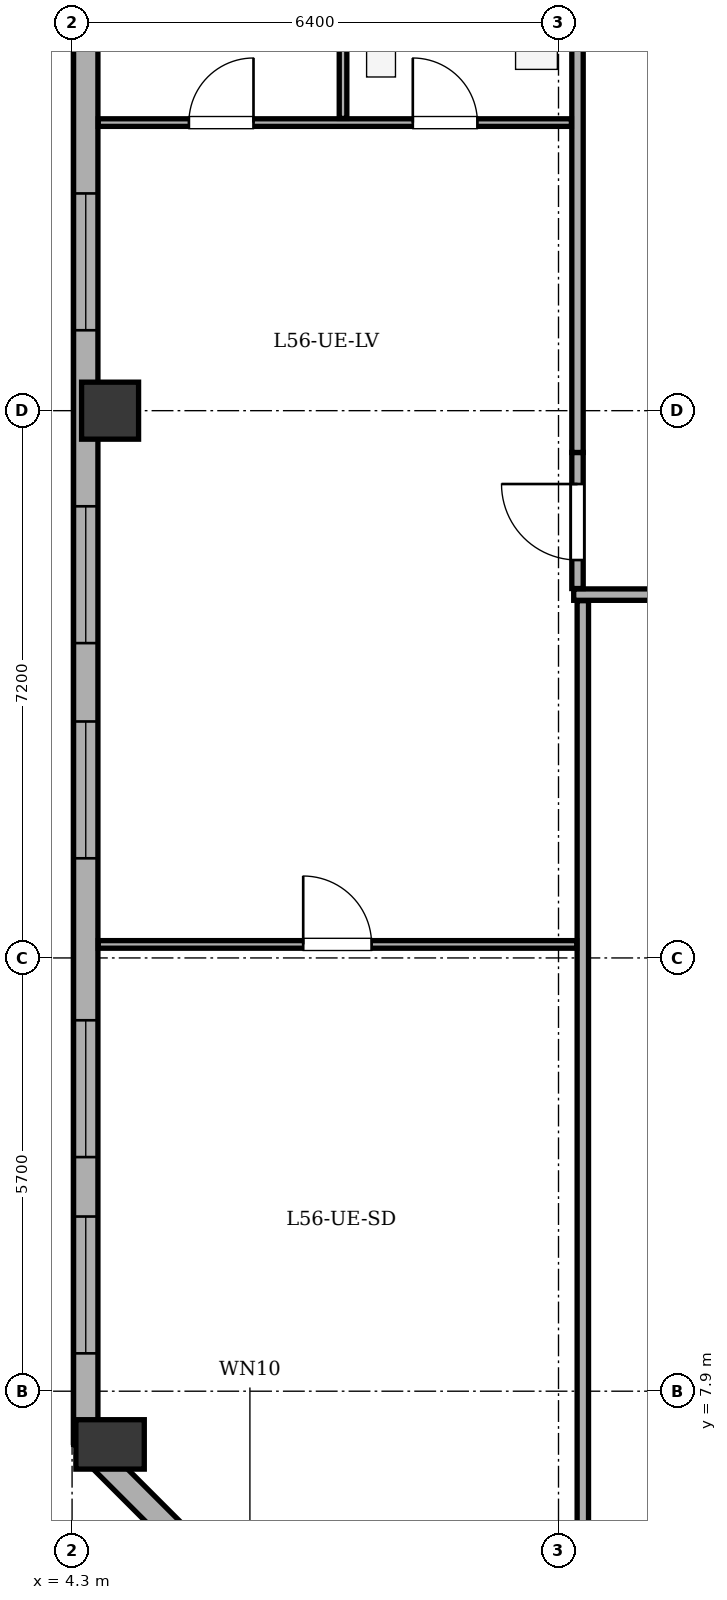
"""IFC4 building model, lengths in metres.
Left out: names, types, materials, properties, quantities, classifications, styles, units other than length and angle.
Written with IfcOpenShell. Run it as: python <this file> out.ifc"""

import sys

from ifc_helpers import new_model, si_unit, direction, frame, frame_2d, origin, origin_2d, place, context, subcontext, project, spatial, rectangle, extrude, element, fill, save


model = new_model("IFC4")
c1 = context("Model", 3, precision=1e-05, world=origin(), true_north=direction((0.0, 1.0)))
c2 = subcontext(c1, "Body", "Model", "MODEL_VIEW")
j1 = project(units=[si_unit("LENGTHUNIT", "METRE"), si_unit("PLANEANGLEUNIT", "RADIAN")], contexts=[c1])
p1 = place(None, origin())
s1 = spatial("IfcSite", under=j1, at=p1, CompositionType="ELEMENT")
p2 = place(p1, origin())
s2 = spatial("IfcBuilding", under=s1, at=p2, CompositionType="ELEMENT")
p3 = place(p2, frame((0.0, 0.0, 217.7)))
s3 = spatial("IfcBuildingStorey", under=s2, at=p3, CompositionType="ELEMENT", Elevation=217.7)
p4 = place(p3, frame((4.8, 7.2, 0.0), z_axis=(0.0, 0.0, 1.0), x_axis=(1.0, 0.0, 0.0)))
e1 = element("IfcColumn", 1, at=p4, inside=s3, PredefinedType="COLUMN", context=c2, shape_type="SweptSolid", body=[
    extrude(rectangle(XDim=0.65, YDim=0.9, at=origin_2d()), origin(), (0.0, 0.0, 1.0), 3.4),
])
p5 = place(p3, frame((4.8, 20.8, 0.0), z_axis=(0.0, 0.0, 1.0), x_axis=(1.0, 0.0, 0.0)))
e2 = element("IfcColumn", 2, at=p5, inside=s3, PredefinedType="COLUMN", context=c2, shape_type="SweptSolid", body=[
    extrude(rectangle(XDim=0.75, YDim=0.75, at=origin_2d()), origin(), (0.0, 0.0, 1.0), 3.4),
])
p6 = place(p3, frame((8.8, 2.88, 0.0), z_axis=(0.0, 0.0, 1.0), x_axis=(-0.707106781187, 0.707106781187, 0.0)))
e3 = element("IfcWall", 3, at=p6, inside=s3, PredefinedType="STANDARD", context=c2, shape_type="SweptSolid", body=[
    extrude(rectangle(XDim=6.11, YDim=0.32, at=frame_2d((3.055, 0.0))), origin(), (0.0, 0.0, 1.0), 2.725),
])
p7 = place(p6, frame((2.355, 0.0, 0.75)))
e4 = element("IfcOpeningElement", 4, at=p7, cuts=e3, PredefinedType="OPENING", context=c2, shape_type="SweptSolid", body=[
    extrude(rectangle(XDim=1.4, YDim=1.65, at=frame_2d((0.7, 0.825))), frame((0.0, 0.17, 0.0), z_axis=(0.0, -1.0, 0.0), x_axis=(1.0, 0.0, 0.0)), (0.0, 0.0, 1.0), 0.34),
])
p8 = place(p3, frame((4.48, 7.2, 0.0), z_axis=(0.0, 0.0, 1.0), x_axis=(0.0, 1.0, 0.0)))
e5 = element("IfcWall", 5, at=p8, inside=s3, PredefinedType="STANDARD", context=c2, shape_type="SweptSolid", body=[
    extrude(rectangle(XDim=27.8, YDim=0.32, at=frame_2d((13.9, 0.0))), origin(), (0.0, 0.0, 1.0), 2.725),
])
p9 = place(p8, frame((1.198, 0.0, 0.75)))
e6 = element("IfcOpeningElement", 6, at=p9, cuts=e5, PredefinedType="OPENING", context=c2, shape_type="SweptSolid", body=[
    extrude(rectangle(XDim=1.8, YDim=1.7, at=frame_2d((0.9, 0.85))), frame((0.0, 0.17, 0.0), z_axis=(0.0, -1.0, 0.0), x_axis=(1.0, 0.0, 0.0)), (0.0, 0.0, 1.0), 0.34),
])
p10 = place(p8, frame((3.78, 0.0, 0.75)))
e7 = element("IfcOpeningElement", 7, at=p10, cuts=e5, PredefinedType="OPENING", context=c2, shape_type="SweptSolid", body=[
    extrude(rectangle(XDim=1.8, YDim=1.7, at=frame_2d((0.9, 0.85))), frame((0.0, 0.17, 0.0), z_axis=(0.0, -1.0, 0.0), x_axis=(1.0, 0.0, 0.0)), (0.0, 0.0, 1.0), 0.34),
])
p11 = place(p8, frame((7.711, 0.0, 0.75)))
e8 = element("IfcOpeningElement", 8, at=p11, cuts=e5, PredefinedType="OPENING", context=c2, shape_type="SweptSolid", body=[
    extrude(rectangle(XDim=1.8, YDim=1.7, at=frame_2d((0.9, 0.85))), frame((0.0, 0.17, 0.0), z_axis=(0.0, -1.0, 0.0), x_axis=(1.0, 0.0, 0.0)), (0.0, 0.0, 1.0), 0.34),
])
p12 = place(p8, frame((10.542, 0.0, 0.75)))
e9 = element("IfcOpeningElement", 9, at=p12, cuts=e5, PredefinedType="OPENING", context=c2, shape_type="SweptSolid", body=[
    extrude(rectangle(XDim=1.8, YDim=1.7, at=frame_2d((0.9, 0.85))), frame((0.0, 0.17, 0.0), z_axis=(0.0, -1.0, 0.0), x_axis=(1.0, 0.0, 0.0)), (0.0, 0.0, 1.0), 0.34),
])
p13 = place(p8, frame((14.658, 0.0, 0.75)))
e10 = element("IfcOpeningElement", 10, at=p13, cuts=e5, PredefinedType="OPENING", context=c2, shape_type="SweptSolid", body=[
    extrude(rectangle(XDim=1.8, YDim=1.7, at=frame_2d((0.9, 0.85))), frame((0.0, 0.17, 0.0), z_axis=(0.0, -1.0, 0.0), x_axis=(1.0, 0.0, 0.0)), (0.0, 0.0, 1.0), 0.34),
])
p14 = place(p8, frame((23.543, 0.0, 0.75)))
e11 = element("IfcOpeningElement", 11, at=p14, cuts=e5, PredefinedType="OPENING", context=c2, shape_type="SweptSolid", body=[
    extrude(rectangle(XDim=1.8, YDim=1.7, at=frame_2d((0.9, 0.85))), frame((0.0, 0.17, 0.0), z_axis=(0.0, -1.0, 0.0), x_axis=(1.0, 0.0, 0.0)), (0.0, 0.0, 1.0), 0.34),
])
p15 = place(p3, frame((10.9, 18.38, 0.0), z_axis=(0.0, 0.0, 1.0), x_axis=(1.0, 0.0, 0.0)))
e12 = element("IfcWall", 12, at=p15, inside=s3, PredefinedType="PARTITIONING", context=c2, shape_type="SweptSolid", body=[
    extrude(rectangle(XDim=34.02, YDim=0.15, at=frame_2d((17.01, 0.0))), origin(), (0.0, 0.0, 1.0), 3.1),
])
p16 = place(p15, frame((3.674, 0.0, 0.0)))
e13 = element("IfcOpeningElement", 13, at=p16, cuts=e12, PredefinedType="OPENING", context=c2, shape_type="SweptSolid", body=[
    extrude(rectangle(XDim=1.0, YDim=2.1, at=frame_2d((0.5, 1.05))), frame((0.0, 0.085, 0.0), z_axis=(0.0, -1.0, 0.0), x_axis=(1.0, 0.0, 0.0)), (0.0, 0.0, 1.0), 0.17),
])
p17 = place(p15, frame((12.118, 0.0, 0.0)))
e14 = element("IfcOpeningElement", 14, at=p17, cuts=e12, PredefinedType="OPENING", context=c2, shape_type="SweptSolid", body=[
    extrude(rectangle(XDim=1.0, YDim=2.1, at=frame_2d((0.5, 1.05))), frame((0.0, 0.085, 0.0), z_axis=(0.0, -1.0, 0.0), x_axis=(1.0, 0.0, 0.0)), (0.0, 0.0, 1.0), 0.17),
])
p18 = place(p15, frame((20.901, 0.0, 0.0)))
e15 = element("IfcOpeningElement", 15, at=p18, cuts=e12, PredefinedType="OPENING", context=c2, shape_type="SweptSolid", body=[
    extrude(rectangle(XDim=1.0, YDim=2.1, at=frame_2d((0.5, 1.05))), frame((0.0, 0.085, 0.0), z_axis=(0.0, -1.0, 0.0), x_axis=(1.0, 0.0, 0.0)), (0.0, 0.0, 1.0), 0.17),
])
p19 = place(p15, frame((29.346, 0.0, 0.0)))
e16 = element("IfcOpeningElement", 16, at=p19, cuts=e12, PredefinedType="OPENING", context=c2, shape_type="SweptSolid", body=[
    extrude(rectangle(XDim=1.0, YDim=2.1, at=frame_2d((0.5, 1.05))), frame((0.0, 0.085, 0.0), z_axis=(0.0, -1.0, 0.0), x_axis=(1.0, 0.0, 0.0)), (0.0, 0.0, 1.0), 0.17),
])
p20 = place(p3, frame((11.02, 3.045, 0.0), z_axis=(0.0, 0.0, 1.0), x_axis=(0.0, 1.0, 0.0)))
e17 = element("IfcWall", 17, at=p20, inside=s3, PredefinedType="PARTITIONING", context=c2, shape_type="SweptSolid", body=[
    extrude(rectangle(XDim=15.255, YDim=0.15, at=frame_2d((7.627, 0.0))), origin(), (0.0, 0.0, 1.0), 3.1),
])
p21 = place(p3, frame((10.95, 18.46, 0.0), z_axis=(0.0, 0.0, 1.0), x_axis=(0.0, 1.0, 0.0)))
e18 = element("IfcWall", 18, at=p21, inside=s3, PredefinedType="PARTITIONING", context=c2, shape_type="SweptSolid", body=[
    extrude(rectangle(XDim=1.79, YDim=0.15, at=frame_2d((0.895, 0.0))), origin(), (0.0, 0.0, 1.0), 3.1),
])
p22 = place(p21, frame((0.375, 0.0, 0.0)))
e19 = element("IfcOpeningElement", 19, at=p22, cuts=e18, PredefinedType="OPENING", context=c2, shape_type="SweptSolid", body=[
    extrude(rectangle(XDim=1.0, YDim=2.1, at=frame_2d((0.5, 1.05))), frame((0.0, 0.085, 0.0), z_axis=(0.0, -1.0, 0.0), x_axis=(1.0, 0.0, 0.0)), (0.0, 0.0, 1.0), 0.17),
])
p23 = place(p3, frame((10.95, 20.25, 0.0), z_axis=(0.0, 0.0, 1.0), x_axis=(0.0, 1.0, 0.0)))
e20 = element("IfcWall", 20, at=p23, inside=s3, PredefinedType="PARTITIONING", context=c2, shape_type="SweptSolid", body=[
    extrude(rectangle(XDim=13.9, YDim=0.15, at=frame_2d((6.95, 0.0))), origin(), (0.0, 0.0, 1.0), 3.1),
])
p24 = place(p3, frame((4.645, 24.59, 0.0), z_axis=(0.0, 0.0, 1.0), x_axis=(1.0, 0.0, 0.0)))
e21 = element("IfcWall", 21, at=p24, inside=s3, PredefinedType="PARTITIONING", context=c2, shape_type="SweptSolid", body=[
    extrude(rectangle(XDim=6.225, YDim=0.1, at=frame_2d((3.113, 0.0))), origin(), (0.0, 0.0, 1.0), 3.1),
])
p25 = place(p24, frame((1.192, 0.0, 0.0)))
e22 = element("IfcOpeningElement", 22, at=p25, cuts=e21, PredefinedType="OPENING", context=c2, shape_type="SweptSolid", body=[
    extrude(rectangle(XDim=0.85, YDim=2.05, at=frame_2d((0.425, 1.025))), frame((0.0, 0.06, 0.0), z_axis=(0.0, -1.0, 0.0), x_axis=(1.0, 0.0, 0.0)), (0.0, 0.0, 1.0), 0.12),
])
p26 = place(p24, frame((4.138, 0.0, 0.0)))
e23 = element("IfcOpeningElement", 23, at=p26, cuts=e21, PredefinedType="OPENING", context=c2, shape_type="SweptSolid", body=[
    extrude(rectangle(XDim=0.85, YDim=2.05, at=frame_2d((0.425, 1.025))), frame((0.0, 0.06, 0.0), z_axis=(0.0, -1.0, 0.0), x_axis=(1.0, 0.0, 0.0)), (0.0, 0.0, 1.0), 0.12),
])
p27 = place(p3, frame((4.645, 13.778, 0.0), z_axis=(0.0, 0.0, 1.0), x_axis=(1.0, 0.0, 0.0)))
e24 = element("IfcWall", 24, at=p27, inside=s3, PredefinedType="PARTITIONING", context=c2, shape_type="SweptSolid", body=[
    extrude(rectangle(XDim=6.295, YDim=0.1, at=frame_2d((3.147, 0.0))), origin(), (0.0, 0.0, 1.0), 3.1),
])
p28 = place(p27, frame((2.696, 0.0, 0.0)))
e25 = element("IfcOpeningElement", 25, at=p28, cuts=e24, PredefinedType="OPENING", context=c2, shape_type="SweptSolid", body=[
    extrude(rectangle(XDim=0.9, YDim=2.05, at=frame_2d((0.45, 1.025))), frame((0.0, 0.06, 0.0), z_axis=(0.0, -1.0, 0.0), x_axis=(1.0, 0.0, 0.0)), (0.0, 0.0, 1.0), 0.12),
])
p29 = place(p3, frame((7.865, 24.645, 0.0), z_axis=(0.0, 0.0, 1.0), x_axis=(0.0, 1.0, 0.0)))
e26 = element("IfcWall", 26, at=p29, inside=s3, PredefinedType="PARTITIONING", context=c2, shape_type="SweptSolid", body=[
    extrude(rectangle(XDim=2.475, YDim=0.1, at=frame_2d((1.238, 0.0))), origin(), (0.0, 0.0, 1.0), 3.1),
])
p30 = place(p9, origin())
e27 = element("IfcWindow", 27, at=p30, inside=s3, PartitioningType="SINGLE_PANEL", PredefinedType="WINDOW", context=c2, shape_type="SweptSolid", body=[
    extrude(rectangle(XDim=1.8, YDim=1.7, at=frame_2d((0.9, 0.85))), frame((0.0, -0.01, 0.0), z_axis=(0.0, -1.0, 0.0), x_axis=(1.0, 0.0, 0.0)), (0.0, 0.0, 1.0), 0.06),
])
fill(e6, e27)
p31 = place(p10, origin())
e28 = element("IfcWindow", 28, at=p31, inside=s3, PartitioningType="SINGLE_PANEL", PredefinedType="WINDOW", context=c2, shape_type="SweptSolid", body=[
    extrude(rectangle(XDim=1.8, YDim=1.7, at=frame_2d((0.9, 0.85))), frame((0.0, -0.01, 0.0), z_axis=(0.0, -1.0, 0.0), x_axis=(1.0, 0.0, 0.0)), (0.0, 0.0, 1.0), 0.06),
])
fill(e7, e28)
p32 = place(p11, origin())
e29 = element("IfcWindow", 29, at=p32, inside=s3, PartitioningType="SINGLE_PANEL", PredefinedType="WINDOW", context=c2, shape_type="SweptSolid", body=[
    extrude(rectangle(XDim=1.8, YDim=1.7, at=frame_2d((0.9, 0.85))), frame((0.0, -0.01, 0.0), z_axis=(0.0, -1.0, 0.0), x_axis=(1.0, 0.0, 0.0)), (0.0, 0.0, 1.0), 0.06),
])
fill(e8, e29)
p33 = place(p12, origin())
e30 = element("IfcWindow", 30, at=p33, inside=s3, PartitioningType="SINGLE_PANEL", PredefinedType="WINDOW", context=c2, shape_type="SweptSolid", body=[
    extrude(rectangle(XDim=1.8, YDim=1.7, at=frame_2d((0.9, 0.85))), frame((0.0, -0.01, 0.0), z_axis=(0.0, -1.0, 0.0), x_axis=(1.0, 0.0, 0.0)), (0.0, 0.0, 1.0), 0.06),
])
fill(e9, e30)
p34 = place(p13, origin())
e31 = element("IfcWindow", 31, at=p34, inside=s3, PartitioningType="SINGLE_PANEL", PredefinedType="WINDOW", context=c2, shape_type="SweptSolid", body=[
    extrude(rectangle(XDim=1.8, YDim=1.7, at=frame_2d((0.9, 0.85))), frame((0.0, -0.01, 0.0), z_axis=(0.0, -1.0, 0.0), x_axis=(1.0, 0.0, 0.0)), (0.0, 0.0, 1.0), 0.06),
])
fill(e10, e31)
p35 = place(p22, origin())
e32 = element("IfcDoor", 32, at=p35, inside=s3, OperationType="SINGLE_SWING_RIGHT", PredefinedType="DOOR", context=c2, shape_type="SweptSolid", body=[
    extrude(rectangle(XDim=1.0, YDim=2.1, at=frame_2d((0.5, 1.05))), frame((0.0, 0.025, 0.0), z_axis=(0.0, -1.0, 0.0), x_axis=(1.0, 0.0, 0.0)), (0.0, 0.0, 1.0), 0.05),
])
fill(e19, e32)
p36 = place(p28, origin())
e33 = element("IfcDoor", 33, at=p36, inside=s3, OperationType="SINGLE_SWING_LEFT", PredefinedType="DOOR", context=c2, shape_type="SweptSolid", body=[
    extrude(rectangle(XDim=0.9, YDim=2.05, at=frame_2d((0.45, 1.025))), frame((0.0, 0.025, 0.0), z_axis=(0.0, -1.0, 0.0), x_axis=(1.0, 0.0, 0.0)), (0.0, 0.0, 1.0), 0.05),
])
fill(e25, e33)
p37 = place(p25, origin())
e34 = element("IfcDoor", 34, at=p37, inside=s3, OperationType="SINGLE_SWING_RIGHT", PredefinedType="DOOR", context=c2, shape_type="SweptSolid", body=[
    extrude(rectangle(XDim=0.85, YDim=2.05, at=frame_2d((0.425, 1.025))), frame((0.0, 0.025, 0.0), z_axis=(0.0, -1.0, 0.0), x_axis=(1.0, 0.0, 0.0)), (0.0, 0.0, 1.0), 0.05),
])
fill(e22, e34)
p38 = place(p26, origin())
e35 = element("IfcDoor", 35, at=p38, inside=s3, OperationType="SINGLE_SWING_LEFT", PredefinedType="DOOR", context=c2, shape_type="SweptSolid", body=[
    extrude(rectangle(XDim=0.85, YDim=2.05, at=frame_2d((0.425, 1.025))), frame((0.0, 0.025, 0.0), z_axis=(0.0, -1.0, 0.0), x_axis=(1.0, 0.0, 0.0)), (0.0, 0.0, 1.0), 0.05),
])
fill(e23, e35)
save(model, sys.argv[1])
